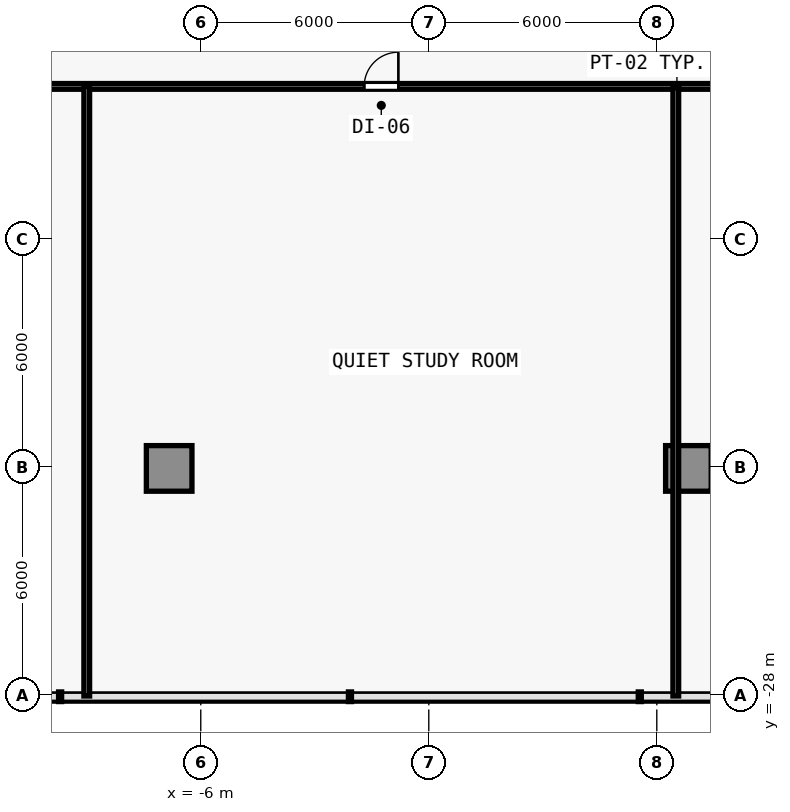
"""IFC4 building model, lengths in metres.
Left out: names, types, materials, properties, quantities, classifications, styles, units other than length and angle.
Written with IfcOpenShell. Run it as: python <this file> out.ifc"""

import sys

from ifc_helpers import new_model, si_unit, direction, frame, frame_2d, origin, origin_2d, place, context, subcontext, project, spatial, rectangle, extrude, element, fill, save


model = new_model("IFC4")
c1 = context("Model", 3, precision=1e-05, world=origin(), true_north=direction((0.0, 1.0)))
c2 = subcontext(c1, "Body", "Model", "MODEL_VIEW")
j1 = project(units=[si_unit("LENGTHUNIT", "METRE"), si_unit("PLANEANGLEUNIT", "RADIAN")], contexts=[c1])
p1 = place(None, origin())
s1 = spatial("IfcSite", under=j1, at=p1, CompositionType="ELEMENT")
p2 = place(p1, origin())
s2 = spatial("IfcBuilding", under=s1, at=p2, CompositionType="ELEMENT")
p3 = place(p2, frame((0.0, 0.0, 13.4)))
s3 = spatial("IfcBuildingStorey", under=s2, at=p3, CompositionType="ELEMENT", Elevation=13.4)
for number, where, z_axis, x_axis in (
    (1, (-6.832, -22.032, 0.0), (0.0, 0.0, 1.0), (1.0, 0.0, 0.0)),
    (2, (6.832, -22.032, 0.0), (0.0, 0.0, 1.0), (1.0, 0.0, 0.0)),
):
    element("IfcColumn", number, at=place(p3, frame(where, z_axis=z_axis, x_axis=x_axis)), inside=s3, PredefinedType="COLUMN", context=c2, shape_type="SweptSolid", body=[
        extrude(rectangle(XDim=1.2, YDim=1.2, at=origin_2d()), origin(), (0.0, 0.0, 1.0), 4.2),
    ])
p4 = place(p3, frame((-10.22, -11.98, 0.0), z_axis=(0.0, 0.0, 1.0), x_axis=(1.0, 0.0, 0.0)))
e3 = element("IfcWall", 3, at=p4, inside=s3, PredefinedType="PARTITIONING", context=c2, shape_type="SweptSolid", body=[
    extrude(rectangle(XDim=33.5, YDim=0.15, at=frame_2d((16.75, 0.0))), origin(), (0.0, 0.0, 1.0), 3.195),
])
p5 = place(p4, frame((8.52, 0.0, 0.0)))
e4 = element("IfcOpeningElement", 4, at=p5, cuts=e3, PredefinedType="OPENING", context=c2, shape_type="SweptSolid", body=[
    extrude(rectangle(XDim=0.9, YDim=2.1, at=frame_2d((0.45, 1.05))), frame((0.0, 0.085, 0.0), z_axis=(0.0, -1.0, 0.0), x_axis=(1.0, 0.0, 0.0)), (0.0, 0.0, 1.0), 0.17),
])
p6 = place(p4, frame((23.27, 0.0, 0.0)))
e5 = element("IfcOpeningElement", 5, at=p6, cuts=e3, PredefinedType="OPENING", context=c2, shape_type="SweptSolid", body=[
    extrude(rectangle(XDim=0.9, YDim=2.1, at=frame_2d((0.45, 1.05))), frame((0.0, 0.085, 0.0), z_axis=(0.0, -1.0, 0.0), x_axis=(1.0, 0.0, 0.0)), (0.0, 0.0, 1.0), 0.17),
])
for number, where, z_axis, x_axis in (
    (6, (-9.0, -28.02, 0.0), (0.0, 0.0, 1.0), (0.0, 1.0, 0.0)),
    (7, (6.5, -28.02, 0.0), (0.0, 0.0, 1.0), (0.0, 1.0, 0.0)),
):
    element("IfcWall", number, at=place(p3, frame(where, z_axis=z_axis, x_axis=x_axis)), inside=s3, PredefinedType="PARTITIONING", context=c2, shape_type="SweptSolid", body=[
        extrude(rectangle(XDim=16.04, YDim=0.15, at=frame_2d((8.02, 0.0))), origin(), (0.0, 0.0, 1.0), 3.195),
    ])
p7 = place(p5, origin())
e8 = element("IfcDoor", 8, at=p7, inside=s3, OperationType="SINGLE_SWING_RIGHT", PredefinedType="DOOR", context=c2, shape_type="SweptSolid", body=[
    extrude(rectangle(XDim=0.9, YDim=2.1, at=frame_2d((0.45, 1.05))), frame((0.0, 0.025, 0.0), z_axis=(0.0, -1.0, 0.0), x_axis=(1.0, 0.0, 0.0)), (0.0, 0.0, 1.0), 0.05),
])
fill(e4, e8)
save(model, sys.argv[1])
